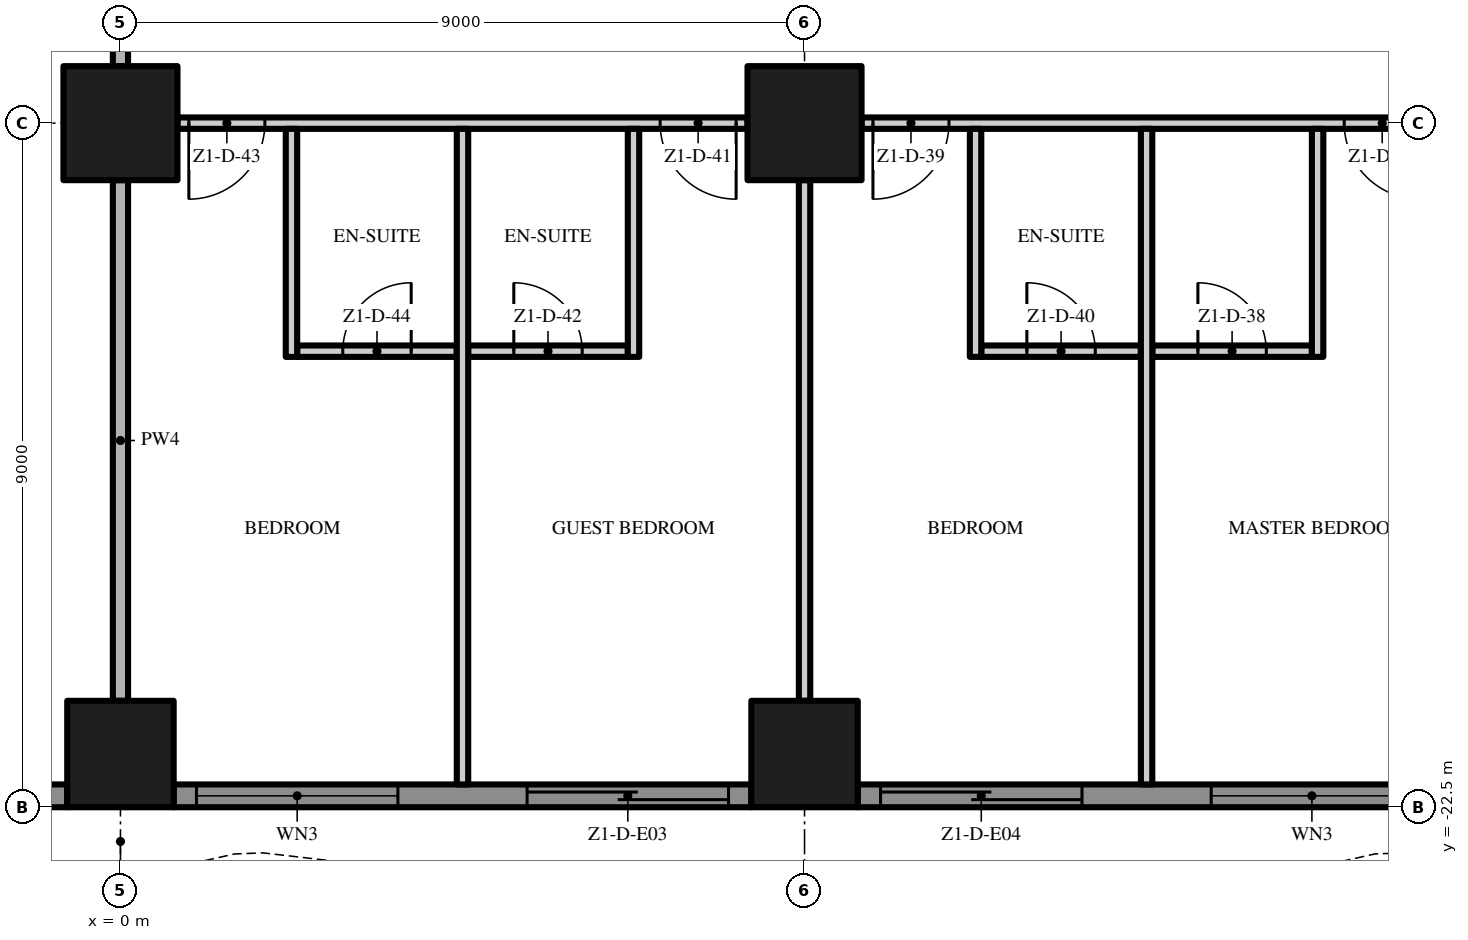
"""IFC4 building model, lengths in metres.
Left out: names, types, materials, properties, quantities, classifications, styles, units other than length and angle.
Written with IfcOpenShell. Run it as: python <this file> out.ifc"""

import sys

from ifc_helpers import new_model, si_unit, direction, frame, frame_2d, origin, origin_2d, place, context, subcontext, project, spatial, polyline, rectangle, outline, extrude, element, fill, save


model = new_model("IFC4")
c1 = context("Model", 3, precision=1e-05, world=origin(), true_north=direction((0.0, 1.0)))
c2 = subcontext(c1, "Body", "Model", "MODEL_VIEW")
j1 = project(units=[si_unit("LENGTHUNIT", "METRE"), si_unit("PLANEANGLEUNIT", "RADIAN")], contexts=[c1])
p1 = place(None, origin())
s1 = spatial("IfcSite", under=j1, at=p1, CompositionType="ELEMENT")
p2 = place(p1, origin())
s2 = spatial("IfcBuilding", under=s1, at=p2, CompositionType="ELEMENT")
p3 = place(p2, frame((0.0, 0.0, 49.2)))
s3 = spatial("IfcBuildingStorey", under=s2, at=p3, CompositionType="ELEMENT", Elevation=49.2)
p4 = place(p3, frame((0.0, -13.5, 0.0), z_axis=(0.0, 0.0, 1.0), x_axis=(1.0, 0.0, 0.0)))
e1 = element("IfcColumn", 1, at=p4, inside=s3, PredefinedType="COLUMN", context=c2, shape_type="SweptSolid", body=[
    extrude(rectangle(XDim=1.5, YDim=1.5, at=origin_2d()), origin(), (0.0, 0.0, 1.0), 3.5),
])
p5 = place(p3, frame((0.0, -21.8, 0.0), z_axis=(0.0, 0.0, 1.0), x_axis=(1.0, 0.0, 0.0)))
e2 = element("IfcColumn", 2, at=p5, inside=s3, PredefinedType="COLUMN", context=c2, shape_type="SweptSolid", body=[
    extrude(rectangle(XDim=1.4, YDim=1.4, at=origin_2d()), origin(), (0.0, 0.0, 1.0), 3.5),
])
p6 = place(p3, frame((9.0, -13.5, 0.0), z_axis=(0.0, 0.0, 1.0), x_axis=(1.0, 0.0, 0.0)))
e3 = element("IfcColumn", 3, at=p6, inside=s3, PredefinedType="COLUMN", context=c2, shape_type="SweptSolid", body=[
    extrude(rectangle(XDim=1.5, YDim=1.5, at=origin_2d()), origin(), (0.0, 0.0, 1.0), 3.5),
])
p7 = place(p3, frame((9.0, -21.8, 0.0), z_axis=(0.0, 0.0, 1.0), x_axis=(1.0, 0.0, 0.0)))
e4 = element("IfcColumn", 4, at=p7, inside=s3, PredefinedType="COLUMN", context=c2, shape_type="SweptSolid", body=[
    extrude(rectangle(XDim=1.4, YDim=1.4, at=origin_2d()), origin(), (0.0, 0.0, 1.0), 3.5),
])
p8 = place(p3, frame((-0.7, -22.35, 0.0), z_axis=(0.0, 0.0, 1.0), x_axis=(-1.0, 0.0, 0.0)))
e5 = element("IfcWall", 5, at=p8, inside=s3, PredefinedType="SOLIDWALL", context=c2, shape_type="SweptSolid", body=[
    extrude(rectangle(XDim=7.6, YDim=0.3, at=frame_2d((3.8, 0.0))), origin(), (0.0, 0.0, 1.0), 3.5),
])
p9 = place(p8, frame((4.65, 0.0, 0.0)))
e6 = element("IfcOpeningElement", 6, at=p9, cuts=e5, PredefinedType="OPENING", context=c2, shape_type="SweptSolid", body=[
    extrude(rectangle(XDim=2.65, YDim=2.4, at=frame_2d((1.325, 1.2))), frame((0.0, 0.16, 0.0), z_axis=(0.0, -1.0, 0.0), x_axis=(1.0, 0.0, 0.0)), (0.0, 0.0, 1.0), 0.32),
])
p10 = place(p8, frame((0.3, 0.0, 0.45)))
e7 = element("IfcOpeningElement", 7, at=p10, cuts=e5, PredefinedType="OPENING", context=c2, shape_type="SweptSolid", body=[
    extrude(rectangle(XDim=2.65, YDim=2.65, at=frame_2d((1.325, 1.325))), frame((0.0, 0.16, 0.0), z_axis=(0.0, -1.0, 0.0), x_axis=(1.0, 0.0, 0.0)), (0.0, 0.0, 1.0), 0.32),
])
p11 = place(p3, frame((8.3, -22.35, 0.0), z_axis=(0.0, 0.0, 1.0), x_axis=(-1.0, 0.0, 0.0)))
e8 = element("IfcWall", 8, at=p11, inside=s3, PredefinedType="SOLIDWALL", context=c2, shape_type="SweptSolid", body=[
    extrude(rectangle(XDim=7.6, YDim=0.3, at=frame_2d((3.8, 0.0))), origin(), (0.0, 0.0, 1.0), 3.5),
])
p12 = place(p11, frame((4.65, 0.0, 0.45)))
e9 = element("IfcOpeningElement", 9, at=p12, cuts=e8, PredefinedType="OPENING", context=c2, shape_type="SweptSolid", body=[
    extrude(rectangle(XDim=2.65, YDim=2.65, at=frame_2d((1.325, 1.325))), frame((0.0, 0.16, 0.0), z_axis=(0.0, -1.0, 0.0), x_axis=(1.0, 0.0, 0.0)), (0.0, 0.0, 1.0), 0.32),
])
p13 = place(p11, frame((0.3, 0.0, 0.0)))
e10 = element("IfcOpeningElement", 10, at=p13, cuts=e8, PredefinedType="OPENING", context=c2, shape_type="SweptSolid", body=[
    extrude(rectangle(XDim=2.65, YDim=2.4, at=frame_2d((1.325, 1.2))), frame((0.0, 0.16, 0.0), z_axis=(0.0, -1.0, 0.0), x_axis=(1.0, 0.0, 0.0)), (0.0, 0.0, 1.0), 0.32),
])
p14 = place(p3, frame((17.3, -22.35, 0.0), z_axis=(0.0, 0.0, 1.0), x_axis=(-1.0, 0.0, 0.0)))
e11 = element("IfcWall", 11, at=p14, inside=s3, PredefinedType="SOLIDWALL", context=c2, shape_type="SweptSolid", body=[
    extrude(rectangle(XDim=7.6, YDim=0.3, at=frame_2d((3.8, 0.0))), origin(), (0.0, 0.0, 1.0), 3.5),
])
p15 = place(p14, frame((4.65, 0.0, 0.0)))
e12 = element("IfcOpeningElement", 12, at=p15, cuts=e11, PredefinedType="OPENING", context=c2, shape_type="SweptSolid", body=[
    extrude(rectangle(XDim=2.65, YDim=2.4, at=frame_2d((1.325, 1.2))), frame((0.0, 0.16, 0.0), z_axis=(0.0, -1.0, 0.0), x_axis=(1.0, 0.0, 0.0)), (0.0, 0.0, 1.0), 0.32),
])
p16 = place(p14, frame((0.3, 0.0, 0.45)))
e13 = element("IfcOpeningElement", 13, at=p16, cuts=e11, PredefinedType="OPENING", context=c2, shape_type="SweptSolid", body=[
    extrude(rectangle(XDim=2.65, YDim=2.65, at=frame_2d((1.325, 1.325))), frame((0.0, 0.16, 0.0), z_axis=(0.0, -1.0, 0.0), x_axis=(1.0, 0.0, 0.0)), (0.0, 0.0, 1.0), 0.32),
])
p17 = place(p3, origin())
e14 = element("IfcWall", 14, at=p17, inside=s3, PredefinedType="USERDEFINED", context=c2, shape_type="SweptSolid", body=[
    extrude(outline(polyline([(-22.5, -25.149), (-21.0, -25.485), (-20.625, -25.5), (-19.5, -25.369), (-18.0, -24.845), (-16.5, -24.112), (-15.0, -23.451), (-13.5, -23.115), (-13.125, -23.1), (-12.0, -23.231), (-10.5, -23.755), (-9.0, -24.488), (-7.5, -25.149), (-6.0, -25.485), (-5.625, -25.5), (-4.5, -25.369), (-3.0, -24.845), (-1.5, -24.112), (0.0, -23.451), (1.5, -23.115), (1.875, -23.1), (3.0, -23.231), (4.5, -23.755), (6.0, -24.488), (7.5, -25.149), (9.0, -25.485), (9.375, -25.5), (10.5, -25.369), (12.0, -24.845), (13.5, -24.112), (15.0, -23.451), (16.5, -23.115), (16.875, -23.1), (18.0, -23.231), (19.5, -23.755), (21.0, -24.488), (22.5, -25.149), (22.601, -24.92), (21.105, -24.261), (19.596, -23.524), (18.056, -22.986), (16.885, -22.849), (16.467, -22.866), (14.921, -23.213), (13.395, -23.885), (11.904, -24.614), (10.444, -25.124), (9.365, -25.249), (9.033, -25.236), (7.579, -24.91), (6.105, -24.261), (4.596, -23.524), (3.056, -22.986), (1.885, -22.849), (1.467, -22.866), (-0.079, -23.213), (-1.605, -23.885), (-3.096, -24.614), (-4.556, -25.124), (-5.635, -25.249), (-5.967, -25.236), (-7.421, -24.91), (-8.895, -24.261), (-10.404, -23.524), (-11.944, -22.986), (-13.115, -22.849), (-13.533, -22.866), (-15.079, -23.213), (-16.605, -23.885), (-18.096, -24.614), (-19.556, -25.124), (-20.635, -25.249), (-20.967, -25.236), (-22.445, -24.905), (-22.5, -25.149)])), origin(), (0.0, 0.0, 1.0), 0.9),
])
p18 = place(p3, frame((2.325, -16.5, 0.0), z_axis=(0.0, 0.0, 1.0), x_axis=(1.0, 0.0, 0.0)))
e15 = element("IfcWall", 15, at=p18, inside=s3, PredefinedType="PARTITIONING", context=c2, shape_type="SweptSolid", body=[
    extrude(rectangle(XDim=2.1, YDim=0.15, at=frame_2d((1.05, 0.0))), origin(), (0.0, 0.0, 1.0), 3.5),
])
p19 = place(p18, frame((0.6, 0.0, 0.0)))
e16 = element("IfcOpeningElement", 16, at=p19, cuts=e15, PredefinedType="OPENING", context=c2, shape_type="SweptSolid", body=[
    extrude(rectangle(XDim=0.9, YDim=2.1, at=frame_2d((0.45, 1.05))), frame((0.0, 0.085, 0.0), z_axis=(0.0, -1.0, 0.0), x_axis=(1.0, 0.0, 0.0)), (0.0, 0.0, 1.0), 0.17),
])
p20 = place(p3, frame((4.575, -16.5, 0.0), z_axis=(0.0, 0.0, 1.0), x_axis=(1.0, 0.0, 0.0)))
e17 = element("IfcWall", 17, at=p20, inside=s3, PredefinedType="PARTITIONING", context=c2, shape_type="SweptSolid", body=[
    extrude(rectangle(XDim=2.1, YDim=0.15, at=frame_2d((1.05, 0.0))), origin(), (0.0, 0.0, 1.0), 3.5),
])
p21 = place(p20, frame((0.6, 0.0, 0.0)))
e18 = element("IfcOpeningElement", 18, at=p21, cuts=e17, PredefinedType="OPENING", context=c2, shape_type="SweptSolid", body=[
    extrude(rectangle(XDim=0.9, YDim=2.1, at=frame_2d((0.45, 1.05))), frame((0.0, 0.085, 0.0), z_axis=(0.0, -1.0, 0.0), x_axis=(1.0, 0.0, 0.0)), (0.0, 0.0, 1.0), 0.17),
])
p22 = place(p3, frame((11.325, -16.5, 0.0), z_axis=(0.0, 0.0, 1.0), x_axis=(1.0, 0.0, 0.0)))
e19 = element("IfcWall", 19, at=p22, inside=s3, PredefinedType="PARTITIONING", context=c2, shape_type="SweptSolid", body=[
    extrude(rectangle(XDim=2.1, YDim=0.15, at=frame_2d((1.05, 0.0))), origin(), (0.0, 0.0, 1.0), 3.5),
])
p23 = place(p22, frame((0.6, 0.0, 0.0)))
e20 = element("IfcOpeningElement", 20, at=p23, cuts=e19, PredefinedType="OPENING", context=c2, shape_type="SweptSolid", body=[
    extrude(rectangle(XDim=0.9, YDim=2.1, at=frame_2d((0.45, 1.05))), frame((0.0, 0.085, 0.0), z_axis=(0.0, -1.0, 0.0), x_axis=(1.0, 0.0, 0.0)), (0.0, 0.0, 1.0), 0.17),
])
p24 = place(p3, frame((13.575, -16.5, 0.0), z_axis=(0.0, 0.0, 1.0), x_axis=(1.0, 0.0, 0.0)))
e21 = element("IfcWall", 21, at=p24, inside=s3, PredefinedType="PARTITIONING", context=c2, shape_type="SweptSolid", body=[
    extrude(rectangle(XDim=2.1, YDim=0.15, at=frame_2d((1.05, 0.0))), origin(), (0.0, 0.0, 1.0), 3.5),
])
p25 = place(p24, frame((0.6, 0.0, 0.0)))
e22 = element("IfcOpeningElement", 22, at=p25, cuts=e21, PredefinedType="OPENING", context=c2, shape_type="SweptSolid", body=[
    extrude(rectangle(XDim=0.9, YDim=2.1, at=frame_2d((0.45, 1.05))), frame((0.0, 0.085, 0.0), z_axis=(0.0, -1.0, 0.0), x_axis=(1.0, 0.0, 0.0)), (0.0, 0.0, 1.0), 0.17),
])
p26 = place(p3, frame((8.25, -13.5, 0.0), z_axis=(0.0, 0.0, 1.0), x_axis=(-1.0, 0.0, 0.0)))
e23 = element("IfcWall", 23, at=p26, inside=s3, PredefinedType="PARTITIONING", context=c2, shape_type="SweptSolid", body=[
    extrude(rectangle(XDim=7.5, YDim=0.15, at=frame_2d((3.75, 0.0))), origin(), (0.0, 0.0, 1.0), 3.5),
])
p27 = place(p26, frame((0.15, 0.0, 0.0)))
e24 = element("IfcOpeningElement", 24, at=p27, cuts=e23, PredefinedType="OPENING", context=c2, shape_type="SweptSolid", body=[
    extrude(rectangle(XDim=1.0, YDim=2.4, at=frame_2d((0.5, 1.2))), frame((0.0, 0.085, 0.0), z_axis=(0.0, -1.0, 0.0), x_axis=(1.0, 0.0, 0.0)), (0.0, 0.0, 1.0), 0.17),
])
p28 = place(p26, frame((6.35, 0.0, 0.0)))
e25 = element("IfcOpeningElement", 25, at=p28, cuts=e23, PredefinedType="OPENING", context=c2, shape_type="SweptSolid", body=[
    extrude(rectangle(XDim=1.0, YDim=2.4, at=frame_2d((0.5, 1.2))), frame((0.0, 0.085, 0.0), z_axis=(0.0, -1.0, 0.0), x_axis=(1.0, 0.0, 0.0)), (0.0, 0.0, 1.0), 0.17),
])
p29 = place(p3, frame((17.25, -13.5, 0.0), z_axis=(0.0, 0.0, 1.0), x_axis=(-1.0, 0.0, 0.0)))
e26 = element("IfcWall", 26, at=p29, inside=s3, PredefinedType="PARTITIONING", context=c2, shape_type="SweptSolid", body=[
    extrude(rectangle(XDim=7.5, YDim=0.15, at=frame_2d((3.75, 0.0))), origin(), (0.0, 0.0, 1.0), 3.5),
])
p30 = place(p29, frame((0.15, 0.0, 0.0)))
e27 = element("IfcOpeningElement", 27, at=p30, cuts=e26, PredefinedType="OPENING", context=c2, shape_type="SweptSolid", body=[
    extrude(rectangle(XDim=1.0, YDim=2.4, at=frame_2d((0.5, 1.2))), frame((0.0, 0.085, 0.0), z_axis=(0.0, -1.0, 0.0), x_axis=(1.0, 0.0, 0.0)), (0.0, 0.0, 1.0), 0.17),
])
p31 = place(p29, frame((6.35, 0.0, 0.0)))
e28 = element("IfcOpeningElement", 28, at=p31, cuts=e26, PredefinedType="OPENING", context=c2, shape_type="SweptSolid", body=[
    extrude(rectangle(XDim=1.0, YDim=2.4, at=frame_2d((0.5, 1.2))), frame((0.0, 0.085, 0.0), z_axis=(0.0, -1.0, 0.0), x_axis=(1.0, 0.0, 0.0)), (0.0, 0.0, 1.0), 0.17),
])
p32 = place(p3, frame((0.0, -21.1, 0.0), z_axis=(0.0, 0.0, 1.0), x_axis=(0.0, 1.0, 0.0)))
e29 = element("IfcWall", 29, at=p32, inside=s3, PredefinedType="PARTITIONING", context=c2, shape_type="SweptSolid", body=[
    extrude(rectangle(XDim=6.85, YDim=0.2, at=frame_2d((3.425, 0.0))), origin(), (0.0, 0.0, 1.0), 3.5),
])
p33 = place(p3, frame((0.0, -12.75, 0.0), z_axis=(0.0, 0.0, 1.0), x_axis=(0.0, 1.0, 0.0)))
e30 = element("IfcWall", 30, at=p33, inside=s3, PredefinedType="PARTITIONING", context=c2, shape_type="SweptSolid", body=[
    extrude(rectangle(XDim=7.5, YDim=0.2, at=frame_2d((3.75, 0.0))), origin(), (0.0, 0.0, 1.0), 3.5),
])
p34 = place(p3, frame((2.25, -16.575, 0.0), z_axis=(0.0, 0.0, 1.0), x_axis=(0.0, 1.0, 0.0)))
e31 = element("IfcWall", 31, at=p34, inside=s3, PredefinedType="PARTITIONING", context=c2, shape_type="SweptSolid", body=[
    extrude(rectangle(XDim=3.0, YDim=0.15, at=frame_2d((1.5, 0.0))), origin(), (0.0, 0.0, 1.0), 3.5),
])
p35 = place(p3, frame((4.5, -22.2, 0.0), z_axis=(0.0, 0.0, 1.0), x_axis=(0.0, 1.0, 0.0)))
e32 = element("IfcWall", 32, at=p35, inside=s3, PredefinedType="PARTITIONING", context=c2, shape_type="SweptSolid", body=[
    extrude(rectangle(XDim=8.625, YDim=0.15, at=frame_2d((4.312, 0.0))), origin(), (0.0, 0.0, 1.0), 3.5),
])
p36 = place(p3, frame((6.75, -16.575, 0.0), z_axis=(0.0, 0.0, 1.0), x_axis=(0.0, 1.0, 0.0)))
e33 = element("IfcWall", 33, at=p36, inside=s3, PredefinedType="PARTITIONING", context=c2, shape_type="SweptSolid", body=[
    extrude(rectangle(XDim=3.0, YDim=0.15, at=frame_2d((1.5, 0.0))), origin(), (0.0, 0.0, 1.0), 3.5),
])
p37 = place(p3, frame((9.0, -21.1, 0.0), z_axis=(0.0, 0.0, 1.0), x_axis=(0.0, 1.0, 0.0)))
e34 = element("IfcWall", 34, at=p37, inside=s3, PredefinedType="PARTITIONING", context=c2, shape_type="SweptSolid", body=[
    extrude(rectangle(XDim=6.85, YDim=0.15, at=frame_2d((3.425, 0.0))), origin(), (0.0, 0.0, 1.0), 3.5),
])
p38 = place(p3, frame((11.25, -16.575, 0.0), z_axis=(0.0, 0.0, 1.0), x_axis=(0.0, 1.0, 0.0)))
e35 = element("IfcWall", 35, at=p38, inside=s3, PredefinedType="PARTITIONING", context=c2, shape_type="SweptSolid", body=[
    extrude(rectangle(XDim=3.0, YDim=0.15, at=frame_2d((1.5, 0.0))), origin(), (0.0, 0.0, 1.0), 3.5),
])
p39 = place(p3, frame((13.5, -22.2, 0.0), z_axis=(0.0, 0.0, 1.0), x_axis=(0.0, 1.0, 0.0)))
e36 = element("IfcWall", 36, at=p39, inside=s3, PredefinedType="PARTITIONING", context=c2, shape_type="SweptSolid", body=[
    extrude(rectangle(XDim=8.625, YDim=0.15, at=frame_2d((4.312, 0.0))), origin(), (0.0, 0.0, 1.0), 3.5),
])
p40 = place(p3, frame((15.75, -16.575, 0.0), z_axis=(0.0, 0.0, 1.0), x_axis=(0.0, 1.0, 0.0)))
e37 = element("IfcWall", 37, at=p40, inside=s3, PredefinedType="PARTITIONING", context=c2, shape_type="SweptSolid", body=[
    extrude(rectangle(XDim=3.0, YDim=0.15, at=frame_2d((1.5, 0.0))), origin(), (0.0, 0.0, 1.0), 3.5),
])
p41 = place(p12, origin())
e38 = element("IfcWindow", 38, at=p41, inside=s3, PartitioningType="SINGLE_PANEL", PredefinedType="WINDOW", context=c2, shape_type="SweptSolid", body=[
    extrude(rectangle(XDim=2.65, YDim=2.65, at=frame_2d((1.325, 1.325))), frame((0.0, 0.03, 0.0), z_axis=(0.0, -1.0, 0.0), x_axis=(1.0, 0.0, 0.0)), (0.0, 0.0, 1.0), 0.06),
])
fill(e9, e38)
p42 = place(p13, origin())
e39 = element("IfcDoor", 39, at=p42, inside=s3, OperationType="SINGLE_SWING_LEFT", PredefinedType="DOOR", context=c2, shape_type="SweptSolid", body=[
    extrude(rectangle(XDim=2.65, YDim=2.4, at=frame_2d((1.325, 1.2))), frame((0.0, 0.025, 0.0), z_axis=(0.0, -1.0, 0.0), x_axis=(1.0, 0.0, 0.0)), (0.0, 0.0, 1.0), 0.05),
])
fill(e10, e39)
p43 = place(p15, origin())
e40 = element("IfcDoor", 40, at=p43, inside=s3, OperationType="SINGLE_SWING_LEFT", PredefinedType="DOOR", context=c2, shape_type="SweptSolid", body=[
    extrude(rectangle(XDim=2.65, YDim=2.4, at=frame_2d((1.325, 1.2))), frame((0.0, 0.025, 0.0), z_axis=(0.0, -1.0, 0.0), x_axis=(1.0, 0.0, 0.0)), (0.0, 0.0, 1.0), 0.05),
])
fill(e12, e40)
p44 = place(p16, origin())
e41 = element("IfcWindow", 41, at=p44, inside=s3, PartitioningType="SINGLE_PANEL", PredefinedType="WINDOW", context=c2, shape_type="SweptSolid", body=[
    extrude(rectangle(XDim=2.65, YDim=2.65, at=frame_2d((1.325, 1.325))), frame((0.0, 0.03, 0.0), z_axis=(0.0, -1.0, 0.0), x_axis=(1.0, 0.0, 0.0)), (0.0, 0.0, 1.0), 0.06),
])
fill(e13, e41)
p45 = place(p30, origin())
e42 = element("IfcDoor", 42, at=p45, inside=s3, OperationType="SINGLE_SWING_LEFT", PredefinedType="DOOR", context=c2, shape_type="SweptSolid", body=[
    extrude(rectangle(XDim=1.0, YDim=2.4, at=frame_2d((0.5, 1.2))), frame((0.0, 0.025, 0.0), z_axis=(0.0, -1.0, 0.0), x_axis=(1.0, 0.0, 0.0)), (0.0, 0.0, 1.0), 0.05),
])
fill(e27, e42)
p46 = place(p25, origin())
e43 = element("IfcDoor", 43, at=p46, inside=s3, OperationType="SINGLE_SWING_LEFT", PredefinedType="DOOR", context=c2, shape_type="SweptSolid", body=[
    extrude(rectangle(XDim=0.9, YDim=2.1, at=frame_2d((0.45, 1.05))), frame((0.0, 0.025, 0.0), z_axis=(0.0, -1.0, 0.0), x_axis=(1.0, 0.0, 0.0)), (0.0, 0.0, 1.0), 0.05),
])
fill(e22, e43)
p47 = place(p31, origin())
e44 = element("IfcDoor", 44, at=p47, inside=s3, OperationType="SINGLE_SWING_RIGHT", PredefinedType="DOOR", context=c2, shape_type="SweptSolid", body=[
    extrude(rectangle(XDim=1.0, YDim=2.4, at=frame_2d((0.5, 1.2))), frame((0.0, 0.025, 0.0), z_axis=(0.0, -1.0, 0.0), x_axis=(1.0, 0.0, 0.0)), (0.0, 0.0, 1.0), 0.05),
])
fill(e28, e44)
p48 = place(p23, origin())
e45 = element("IfcDoor", 45, at=p48, inside=s3, OperationType="SINGLE_SWING_LEFT", PredefinedType="DOOR", context=c2, shape_type="SweptSolid", body=[
    extrude(rectangle(XDim=0.9, YDim=2.1, at=frame_2d((0.45, 1.05))), frame((0.0, 0.025, 0.0), z_axis=(0.0, -1.0, 0.0), x_axis=(1.0, 0.0, 0.0)), (0.0, 0.0, 1.0), 0.05),
])
fill(e20, e45)
p49 = place(p27, origin())
e46 = element("IfcDoor", 46, at=p49, inside=s3, OperationType="SINGLE_SWING_LEFT", PredefinedType="DOOR", context=c2, shape_type="SweptSolid", body=[
    extrude(rectangle(XDim=1.0, YDim=2.4, at=frame_2d((0.5, 1.2))), frame((0.0, 0.025, 0.0), z_axis=(0.0, -1.0, 0.0), x_axis=(1.0, 0.0, 0.0)), (0.0, 0.0, 1.0), 0.05),
])
fill(e24, e46)
p50 = place(p21, origin())
e47 = element("IfcDoor", 47, at=p50, inside=s3, OperationType="SINGLE_SWING_LEFT", PredefinedType="DOOR", context=c2, shape_type="SweptSolid", body=[
    extrude(rectangle(XDim=0.9, YDim=2.1, at=frame_2d((0.45, 1.05))), frame((0.0, 0.025, 0.0), z_axis=(0.0, -1.0, 0.0), x_axis=(1.0, 0.0, 0.0)), (0.0, 0.0, 1.0), 0.05),
])
fill(e18, e47)
p51 = place(p28, origin())
e48 = element("IfcDoor", 48, at=p51, inside=s3, OperationType="SINGLE_SWING_RIGHT", PredefinedType="DOOR", context=c2, shape_type="SweptSolid", body=[
    extrude(rectangle(XDim=1.0, YDim=2.4, at=frame_2d((0.5, 1.2))), frame((0.0, 0.025, 0.0), z_axis=(0.0, -1.0, 0.0), x_axis=(1.0, 0.0, 0.0)), (0.0, 0.0, 1.0), 0.05),
])
fill(e25, e48)
p52 = place(p19, origin())
e49 = element("IfcDoor", 49, at=p52, inside=s3, OperationType="SINGLE_SWING_RIGHT", PredefinedType="DOOR", context=c2, shape_type="SweptSolid", body=[
    extrude(rectangle(XDim=0.9, YDim=2.1, at=frame_2d((0.45, 1.05))), frame((0.0, 0.025, 0.0), z_axis=(0.0, -1.0, 0.0), x_axis=(1.0, 0.0, 0.0)), (0.0, 0.0, 1.0), 0.05),
])
fill(e16, e49)
save(model, sys.argv[1])
